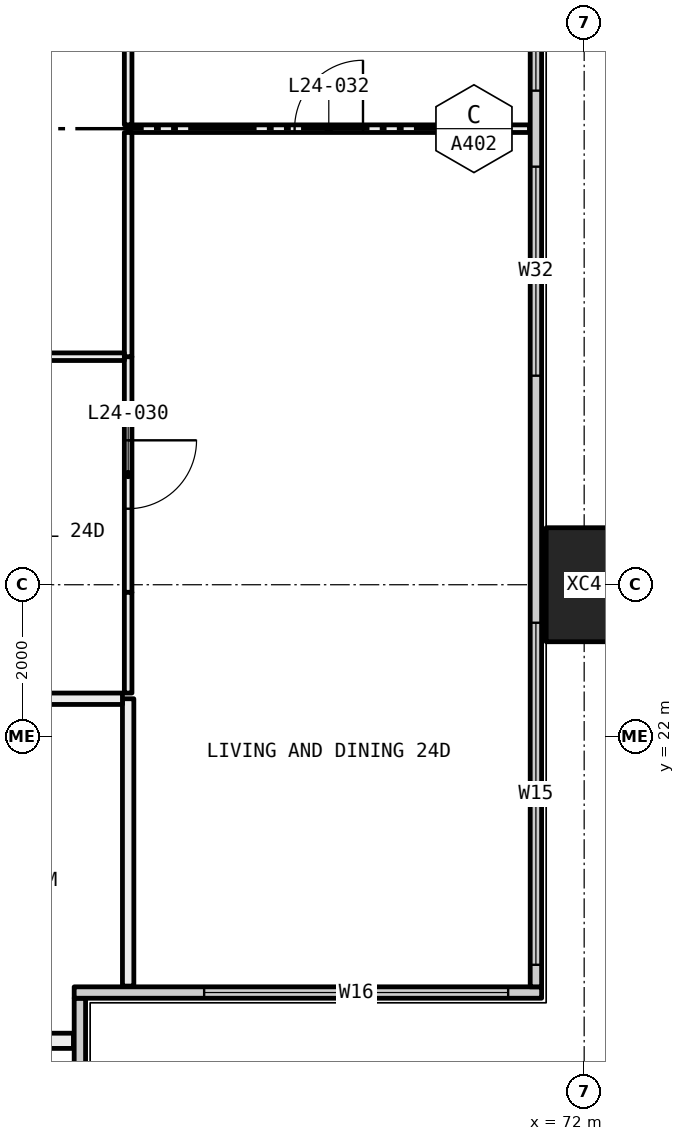
"""IFC4 building model, lengths in metres.
Left out: names, types, materials, properties, quantities, classifications, styles, units other than length and angle.
Written with IfcOpenShell. Run it as: python <this file> out.ifc"""

import sys

from ifc_helpers import new_model, si_unit, direction, frame, frame_2d, origin, origin_2d, place, context, subcontext, project, spatial, rectangle, hollow_rectangle, extrude, element, fill, save


model = new_model("IFC4")
c1 = context("Model", 3, precision=1e-05, world=origin(), true_north=direction((0.0, 1.0)))
c2 = subcontext(c1, "Body", "Model", "MODEL_VIEW")
j1 = project(units=[si_unit("LENGTHUNIT", "METRE"), si_unit("PLANEANGLEUNIT", "RADIAN")], contexts=[c1])
p1 = place(None, origin())
s1 = spatial("IfcSite", under=j1, at=p1, CompositionType="ELEMENT")
p2 = place(p1, origin())
s2 = spatial("IfcBuilding", under=s1, at=p2, CompositionType="ELEMENT")
p3 = place(p2, frame((0.0, 0.0, 96.6)))
s3 = spatial("IfcBuildingStorey", under=s2, at=p3, CompositionType="ELEMENT", Elevation=96.6)
p4 = place(p3, frame((72.0, 24.0, -0.4), z_axis=(0.0, 0.0, 1.0), x_axis=(0.0, 1.0, 0.0)))
e1 = element("IfcColumn", 1, at=p4, inside=s3, PredefinedType="COLUMN", context=c2, shape_type="SweptSolid", body=[
    extrude(hollow_rectangle(XDim=1.5, YDim=1.0, WallThickness=0.06, at=origin_2d()), origin(), (0.0, 0.0, 1.0), 3.45),
])
p5 = place(p3, frame((65.365, 12.71, 0.0), z_axis=(0.0, 0.0, 1.0), x_axis=(0.0, 1.0, 0.0)))
e2 = element("IfcWall", 2, at=p5, inside=s3, PredefinedType="ELEMENTEDWALL", context=c2, shape_type="SweptSolid", body=[
    extrude(rectangle(XDim=5.85, YDim=0.15, at=frame_2d((2.925, 0.0))), origin(), (0.0, 0.0, 1.0), 3.05),
])
p6 = place(p5, frame((0.29, 0.0, 0.45)))
e3 = element("IfcOpeningElement", 3, at=p6, cuts=e2, PredefinedType="OPENING", context=c2, shape_type="SweptSolid", body=[
    extrude(rectangle(XDim=4.0, YDim=2.55, at=frame_2d((2.0, 1.275))), frame((0.0, 0.085, 0.0), z_axis=(0.0, -1.0, 0.0), x_axis=(1.0, 0.0, 0.0)), (0.0, 0.0, 1.0), 0.17),
])
p7 = place(p3, frame((65.29, 18.635, 0.0), z_axis=(0.0, 0.0, 1.0), x_axis=(1.0, 0.0, 0.0)))
e4 = element("IfcWall", 4, at=p7, inside=s3, PredefinedType="ELEMENTEDWALL", context=c2, shape_type="SweptSolid", body=[
    extrude(rectangle(XDim=6.15, YDim=0.15, at=frame_2d((3.075, 0.0))), origin(), (0.0, 0.0, 1.0), 3.05),
])
p8 = place(p7, frame((1.71, 0.0, 0.45)))
e5 = element("IfcOpeningElement", 5, at=p8, cuts=e4, PredefinedType="OPENING", context=c2, shape_type="SweptSolid", body=[
    extrude(rectangle(XDim=4.0, YDim=2.55, at=frame_2d((2.0, 1.275))), frame((0.0, 0.085, 0.0), z_axis=(0.0, -1.0, 0.0), x_axis=(1.0, 0.0, 0.0)), (0.0, 0.0, 1.0), 0.17),
])
p9 = place(p3, frame((71.365, 18.71, 0.0), z_axis=(0.0, 0.0, 1.0), x_axis=(0.0, 1.0, 0.0)))
e6 = element("IfcWall", 6, at=p9, inside=s3, PredefinedType="ELEMENTEDWALL", context=c2, shape_type="SweptSolid", body=[
    extrude(rectangle(XDim=22.58, YDim=0.15, at=frame_2d((11.29, 0.0))), origin(), (0.0, 0.0, 1.0), 3.05),
])
p10 = place(p9, frame((0.29, 0.0, 0.45)))
e7 = element("IfcOpeningElement", 7, at=p10, cuts=e6, PredefinedType="OPENING", context=c2, shape_type="SweptSolid", body=[
    extrude(rectangle(XDim=4.5, YDim=2.55, at=frame_2d((2.25, 1.275))), frame((0.0, 0.085, 0.0), z_axis=(0.0, -1.0, 0.0), x_axis=(1.0, 0.0, 0.0)), (0.0, 0.0, 1.0), 0.17),
])
p11 = place(p9, frame((8.04, 0.0, 0.45)))
e8 = element("IfcOpeningElement", 8, at=p11, cuts=e6, PredefinedType="OPENING", context=c2, shape_type="SweptSolid", body=[
    extrude(rectangle(XDim=2.75, YDim=2.55, at=frame_2d((1.375, 1.275))), frame((0.0, 0.085, 0.0), z_axis=(0.0, -1.0, 0.0), x_axis=(1.0, 0.0, 0.0)), (0.0, 0.0, 1.0), 0.17),
])
p12 = place(p9, frame((11.79, 0.0, 0.45)))
e9 = element("IfcOpeningElement", 9, at=p12, cuts=e6, PredefinedType="OPENING", context=c2, shape_type="SweptSolid", body=[
    extrude(rectangle(XDim=2.0, YDim=2.55, at=frame_2d((1.0, 1.275))), frame((0.0, 0.085, 0.0), z_axis=(0.0, -1.0, 0.0), x_axis=(1.0, 0.0, 0.0)), (0.0, 0.0, 1.0), 0.17),
])
p13 = place(p9, frame((17.79, 0.0, 0.45)))
e10 = element("IfcOpeningElement", 10, at=p13, cuts=e6, PredefinedType="OPENING", context=c2, shape_type="SweptSolid", body=[
    extrude(rectangle(XDim=4.5, YDim=2.55, at=frame_2d((2.25, 1.275))), frame((0.0, 0.085, 0.0), z_axis=(0.0, -1.0, 0.0), x_axis=(1.0, 0.0, 0.0)), (0.0, 0.0, 1.0), 0.17),
])
p14 = place(p3, frame((65.28, 18.0, 0.0), z_axis=(0.0, 0.0, 1.0), x_axis=(-1.0, 0.0, 0.0)))
e11 = element("IfcWall", 11, at=p14, inside=s3, PredefinedType="PARTITIONING", context=c2, shape_type="SweptSolid", body=[
    extrude(rectangle(XDim=3.38, YDim=0.2, at=frame_2d((1.69, 0.0))), origin(), (0.0, 0.0, 1.0), 3.05),
])
p15 = place(p3, frame((71.28, 30.0, 0.0), z_axis=(0.0, 0.0, 1.0), x_axis=(-1.0, 0.0, 0.0)))
e12 = element("IfcWall", 12, at=p15, inside=s3, PredefinedType="PARTITIONING", context=c2, shape_type="SweptSolid", body=[
    extrude(rectangle(XDim=5.28, YDim=0.1, at=frame_2d((2.64, 0.0))), origin(), (0.0, 0.0, 1.0), 3.05),
])
p16 = place(p15, frame((2.19, 0.0, 0.0)))
e13 = element("IfcOpeningElement", 13, at=p16, cuts=e12, PredefinedType="OPENING", context=c2, shape_type="SweptSolid", body=[
    extrude(rectangle(XDim=0.9, YDim=2.1, at=frame_2d((0.45, 1.05))), frame((0.0, 0.06, 0.0), z_axis=(0.0, -1.0, 0.0), x_axis=(1.0, 0.0, 0.0)), (0.0, 0.0, 1.0), 0.12),
])
p17 = place(p3, frame((66.0, 22.5, 0.0), z_axis=(0.0, 0.0, 1.0), x_axis=(0.0, -1.0, 0.0)))
e14 = element("IfcWall", 14, at=p17, inside=s3, PredefinedType="PARTITIONING", context=c2, shape_type="SweptSolid", body=[
    extrude(rectangle(XDim=3.78, YDim=0.15, at=frame_2d((1.89, 0.0))), origin(), (0.0, 0.0, 1.0), 3.05),
])
p18 = place(p3, frame((66.0, 27.0, 0.0), z_axis=(0.0, 0.0, 1.0), x_axis=(0.0, -1.0, 0.0)))
e15 = element("IfcWall", 15, at=p18, inside=s3, PredefinedType="PARTITIONING", context=c2, shape_type="SweptSolid", body=[
    extrude(rectangle(XDim=3.1, YDim=0.1, at=frame_2d((1.55, 0.0))), origin(), (0.0, 0.0, 1.0), 2.45),
])
p19 = place(p18, frame((1.1, 0.0, 0.0)))
e16 = element("IfcOpeningElement", 16, at=p19, cuts=e15, PredefinedType="OPENING", context=c2, shape_type="SweptSolid", body=[
    extrude(rectangle(XDim=0.9, YDim=2.1, at=frame_2d((0.45, 1.05))), frame((0.0, 0.06, 0.0), z_axis=(0.0, -1.0, 0.0), x_axis=(1.0, 0.0, 0.0)), (0.0, 0.0, 1.0), 0.12),
])
p20 = place(p3, frame((66.0, 23.9, 0.0), z_axis=(0.0, 0.0, 1.0), x_axis=(0.0, -1.0, 0.0)))
e17 = element("IfcWall", 17, at=p20, inside=s3, PredefinedType="PARTITIONING", context=c2, shape_type="SweptSolid", body=[
    extrude(rectangle(XDim=1.325, YDim=0.1, at=frame_2d((0.663, 0.0))), origin(), (0.0, 0.0, 1.0), 3.05),
])
p21 = place(p3, frame((66.0, 29.95, 0.0), z_axis=(0.0, 0.0, 1.0), x_axis=(0.0, -1.0, 0.0)))
e18 = element("IfcWall", 18, at=p21, inside=s3, PredefinedType="PARTITIONING", context=c2, shape_type="SweptSolid", body=[
    extrude(rectangle(XDim=2.95, YDim=0.1, at=frame_2d((1.475, 0.0))), origin(), (0.0, 0.0, 1.0), 3.05),
])
p22 = place(p3, frame((66.0, 35.95, 0.0), z_axis=(0.0, 0.0, 1.0), x_axis=(0.0, -1.0, 0.0)))
e19 = element("IfcWall", 19, at=p22, inside=s3, PredefinedType="PARTITIONING", context=c2, shape_type="SweptSolid", body=[
    extrude(rectangle(XDim=5.9, YDim=0.1, at=frame_2d((2.95, 0.0))), origin(), (0.0, 0.0, 1.0), 2.45),
])
p23 = place(p3, frame((65.925, 22.5, 0.0), z_axis=(0.0, 0.0, 1.0), x_axis=(-1.0, 0.0, 0.0)))
e20 = element("IfcWall", 20, at=p23, inside=s3, PredefinedType="PARTITIONING", context=c2, shape_type="SweptSolid", body=[
    extrude(rectangle(XDim=3.925, YDim=0.15, at=frame_2d((1.962, 0.0))), origin(), (0.0, 0.0, 1.0), 3.05),
])
p24 = place(p23, frame((1.512, 0.0, 0.0)))
e21 = element("IfcOpeningElement", 21, at=p24, cuts=e20, PredefinedType="OPENING", context=c2, shape_type="SweptSolid", body=[
    extrude(rectangle(XDim=0.9, YDim=2.1, at=frame_2d((0.45, 1.05))), frame((0.0, 0.085, 0.0), z_axis=(0.0, -1.0, 0.0), x_axis=(1.0, 0.0, 0.0)), (0.0, 0.0, 1.0), 0.17),
])
p25 = place(p3, frame((65.95, 27.0, 0.0), z_axis=(0.0, 0.0, 1.0), x_axis=(-1.0, 0.0, 0.0)))
e22 = element("IfcWall", 22, at=p25, inside=s3, PredefinedType="PARTITIONING", context=c2, shape_type="SweptSolid", body=[
    extrude(rectangle(XDim=3.95, YDim=0.1, at=frame_2d((1.975, 0.0))), origin(), (0.0, 0.0, 1.0), 3.05),
])
p26 = place(p25, frame((1.525, 0.0, 0.0)))
e23 = element("IfcOpeningElement", 23, at=p26, cuts=e22, PredefinedType="OPENING", context=c2, shape_type="SweptSolid", body=[
    extrude(rectangle(XDim=0.9, YDim=2.1, at=frame_2d((0.45, 1.05))), frame((0.0, 0.06, 0.0), z_axis=(0.0, -1.0, 0.0), x_axis=(1.0, 0.0, 0.0)), (0.0, 0.0, 1.0), 0.12),
])
p27 = place(p8, origin())
e24 = element("IfcWindow", 24, at=p27, inside=s3, PartitioningType="SINGLE_PANEL", PredefinedType="WINDOW", context=c2, shape_type="SweptSolid", body=[
    extrude(rectangle(XDim=4.0, YDim=2.55, at=frame_2d((2.0, 1.275))), frame((0.0, 0.03, 0.0), z_axis=(0.0, -1.0, 0.0), x_axis=(1.0, 0.0, 0.0)), (0.0, 0.0, 1.0), 0.06),
])
fill(e5, e24)
p28 = place(p10, origin())
e25 = element("IfcWindow", 25, at=p28, inside=s3, PartitioningType="SINGLE_PANEL", PredefinedType="WINDOW", context=c2, shape_type="SweptSolid", body=[
    extrude(rectangle(XDim=4.5, YDim=2.55, at=frame_2d((2.25, 1.275))), frame((0.0, 0.03, 0.0), z_axis=(0.0, -1.0, 0.0), x_axis=(1.0, 0.0, 0.0)), (0.0, 0.0, 1.0), 0.06),
])
fill(e7, e25)
p29 = place(p11, origin())
e26 = element("IfcWindow", 26, at=p29, inside=s3, PartitioningType="SINGLE_PANEL", PredefinedType="WINDOW", context=c2, shape_type="SweptSolid", body=[
    extrude(rectangle(XDim=2.75, YDim=2.55, at=frame_2d((1.375, 1.275))), frame((0.0, 0.03, 0.0), z_axis=(0.0, -1.0, 0.0), x_axis=(1.0, 0.0, 0.0)), (0.0, 0.0, 1.0), 0.06),
])
fill(e8, e26)
p30 = place(p12, origin())
e27 = element("IfcWindow", 27, at=p30, inside=s3, PartitioningType="SINGLE_PANEL", PredefinedType="WINDOW", context=c2, shape_type="SweptSolid", body=[
    extrude(rectangle(XDim=2.0, YDim=2.55, at=frame_2d((1.0, 1.275))), frame((0.0, 0.03, 0.0), z_axis=(0.0, -1.0, 0.0), x_axis=(1.0, 0.0, 0.0)), (0.0, 0.0, 1.0), 0.06),
])
fill(e9, e27)
p31 = place(p19, origin())
e28 = element("IfcDoor", 28, at=p31, inside=s3, OperationType="SINGLE_SWING_RIGHT", PredefinedType="DOOR", context=c2, shape_type="SweptSolid", body=[
    extrude(rectangle(XDim=0.9, YDim=2.1, at=frame_2d((0.45, 1.05))), frame((0.0, 0.025, 0.0), z_axis=(0.0, -1.0, 0.0), x_axis=(1.0, 0.0, 0.0)), (0.0, 0.0, 1.0), 0.05),
])
fill(e16, e28)
p32 = place(p16, frame((0.9, 0.0, 0.0), x_axis=(-1.0, 0.0, 0.0)))
e29 = element("IfcDoor", 29, at=p32, inside=s3, OperationType="SINGLE_SWING_LEFT", PredefinedType="DOOR", context=c2, shape_type="SweptSolid", body=[
    extrude(rectangle(XDim=0.9, YDim=2.1, at=frame_2d((0.45, 1.05))), frame((0.0, 0.025, 0.0), z_axis=(0.0, -1.0, 0.0), x_axis=(1.0, 0.0, 0.0)), (0.0, 0.0, 1.0), 0.05),
])
fill(e13, e29)
save(model, sys.argv[1])
